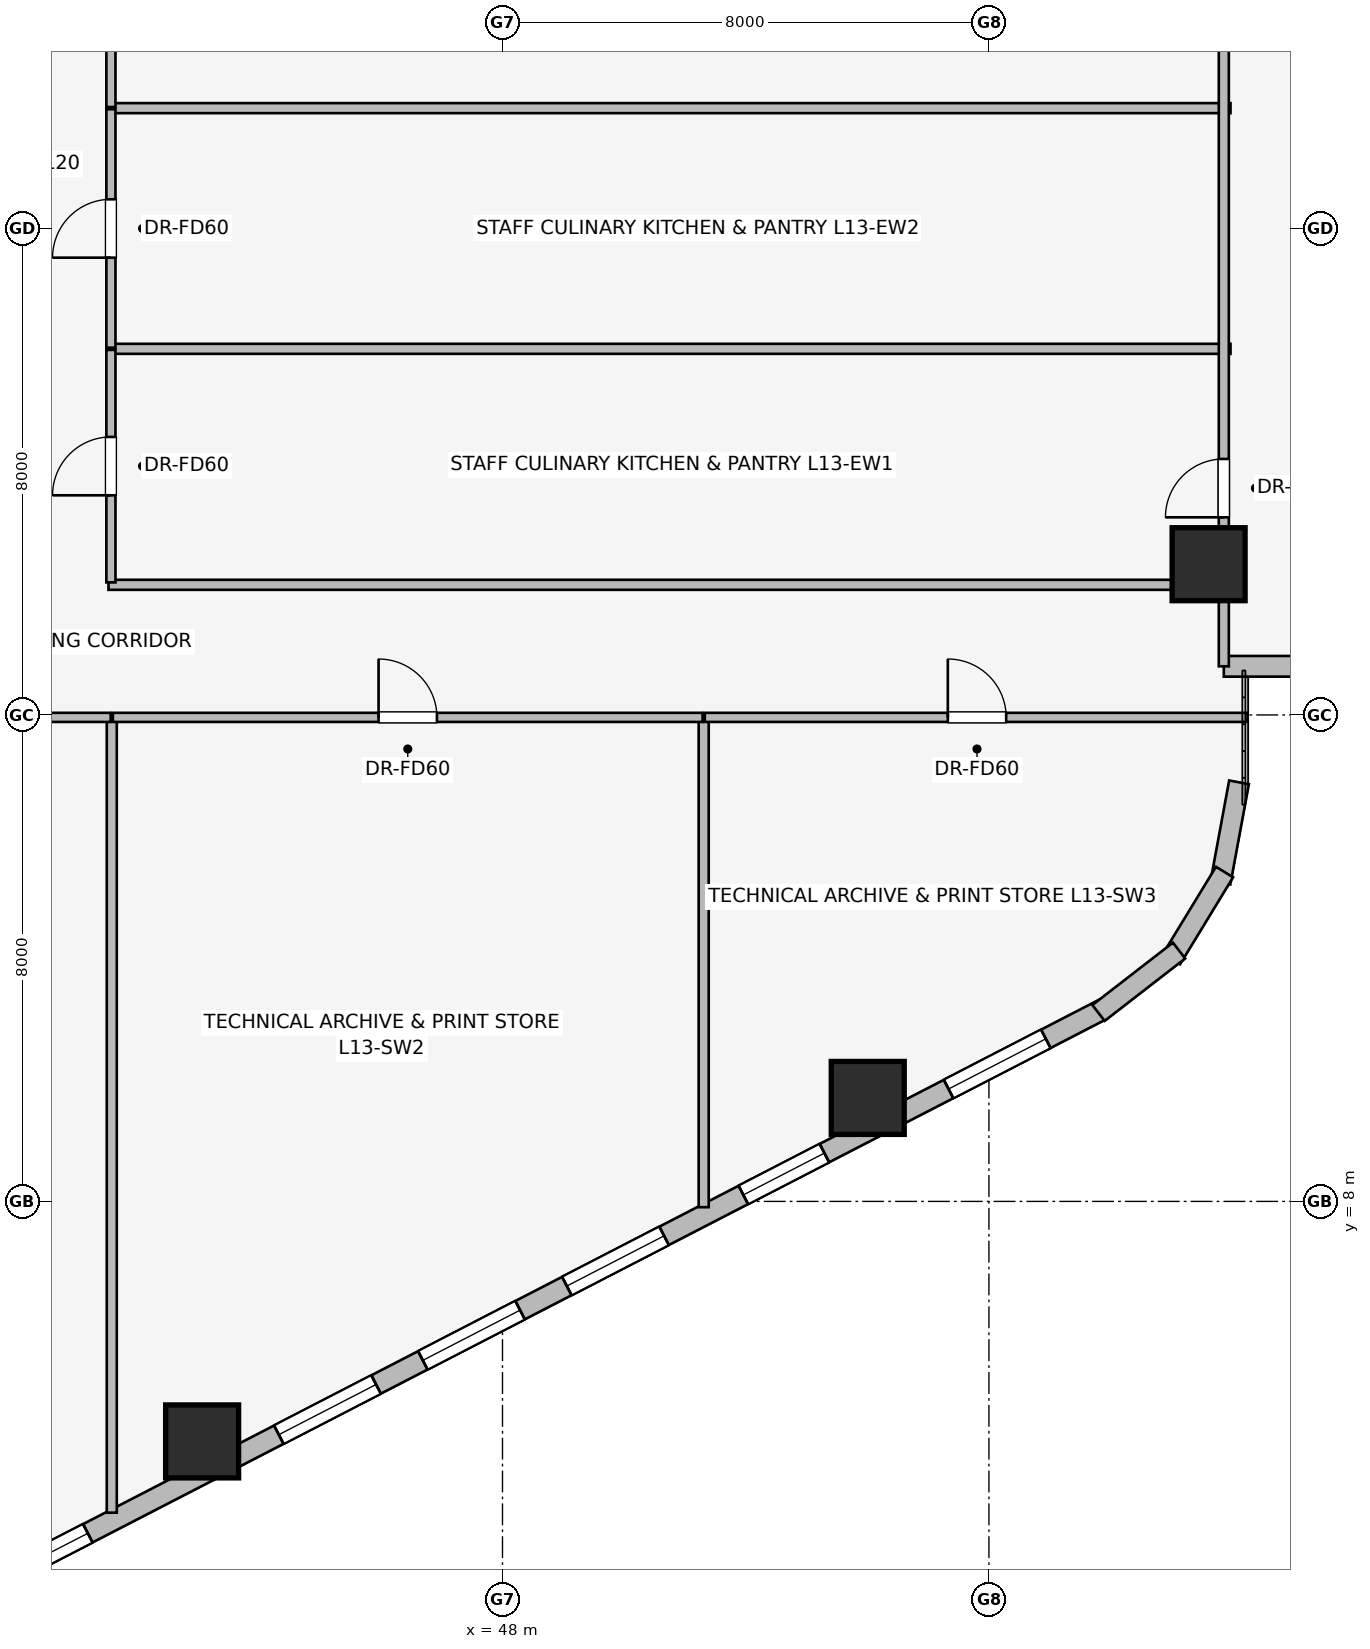
"""IFC4 building model, lengths in metres.
Left out: names, types, materials, properties, quantities, classifications, styles, units other than length and angle.
Written with IfcOpenShell. Run it as: python <this file> out.ifc"""

import sys

from ifc_helpers import new_model, si_unit, direction, frame, frame_2d, origin, origin_2d, place, context, subcontext, project, spatial, rectangle, extrude, element, fill, save


model = new_model("IFC4")
c1 = context("Model", 3, precision=1e-05, world=origin(), true_north=direction((0.0, 1.0)))
c2 = subcontext(c1, "Body", "Model", "MODEL_VIEW")
j1 = project(units=[si_unit("LENGTHUNIT", "METRE"), si_unit("PLANEANGLEUNIT", "RADIAN")], contexts=[c1])
p1 = place(None, origin())
s1 = spatial("IfcSite", under=j1, at=p1, CompositionType="ELEMENT")
p2 = place(p1, origin())
s2 = spatial("IfcBuilding", under=s1, at=p2, CompositionType="ELEMENT")
p3 = place(p2, frame((0.0, 0.0, 52.55)))
s3 = spatial("IfcBuildingStorey", under=s2, at=p3, CompositionType="ELEMENT", Elevation=52.55)
for number, where, z_axis, x_axis in (
    (1, (43.06, 4.053, 0.0), (0.0, 0.0, 1.0), (1.0, 0.0, 0.0)),
    (2, (54.007, 9.702, 0.0), (0.0, 0.0, 1.0), (1.0, 0.0, 0.0)),
    (3, (59.613, 18.479, 0.0), (0.0, 0.0, 1.0), (1.0, 0.0, 0.0)),
):
    element("IfcColumn", number, at=place(p3, frame(where, z_axis=z_axis, x_axis=x_axis)), inside=s3, PredefinedType="COLUMN", context=c2, shape_type="SweptSolid", body=[
        extrude(rectangle(XDim=1.2, YDim=1.2, at=origin_2d()), origin(), (0.0, 0.0, 1.0), 3.65),
    ])
p4 = place(p3, frame((57.876, 11.159, 0.0), z_axis=(0.0, 0.0, 1.0), x_axis=(-0.888634413993, -0.458616264721, 0.0)))
e4 = element("IfcWall", 4, at=p4, inside=s3, PredefinedType="STANDARD", context=c2, shape_type="SweptSolid", body=[
    extrude(rectangle(XDim=20.531, YDim=0.34, at=frame_2d((10.266, 0.0))), origin(), (0.0, 0.0, 1.0), 2.654),
])
p5 = place(p4, frame((1.058, 0.0, 0.75)))
e5 = element("IfcOpeningElement", 5, at=p5, cuts=e4, PredefinedType="OPENING", context=c2, shape_type="SweptSolid", body=[
    extrude(rectangle(XDim=1.8, YDim=1.5, at=frame_2d((0.9, 0.75))), frame((0.0, 0.18, 0.0), z_axis=(0.0, -1.0, 0.0), x_axis=(1.0, 0.0, 0.0)), (0.0, 0.0, 1.0), 0.36),
])
p6 = place(p4, frame((5.156, 0.0, 0.75)))
e6 = element("IfcOpeningElement", 6, at=p6, cuts=e4, PredefinedType="OPENING", context=c2, shape_type="SweptSolid", body=[
    extrude(rectangle(XDim=1.5, YDim=1.5, at=frame_2d((0.75, 0.75))), frame((0.0, 0.18, 0.0), z_axis=(0.0, -1.0, 0.0), x_axis=(1.0, 0.0, 0.0)), (0.0, 0.0, 1.0), 0.36),
])
p7 = place(p4, frame((8.123, 0.0, 0.75)))
e7 = element("IfcOpeningElement", 7, at=p7, cuts=e4, PredefinedType="OPENING", context=c2, shape_type="SweptSolid", body=[
    extrude(rectangle(XDim=1.8, YDim=1.5, at=frame_2d((0.9, 0.75))), frame((0.0, 0.18, 0.0), z_axis=(0.0, -1.0, 0.0), x_axis=(1.0, 0.0, 0.0)), (0.0, 0.0, 1.0), 0.36),
])
p8 = place(p4, frame((10.788, 0.0, 0.75)))
e8 = element("IfcOpeningElement", 8, at=p8, cuts=e4, PredefinedType="OPENING", context=c2, shape_type="SweptSolid", body=[
    extrude(rectangle(XDim=1.8, YDim=1.5, at=frame_2d((0.9, 0.75))), frame((0.0, 0.18, 0.0), z_axis=(0.0, -1.0, 0.0), x_axis=(1.0, 0.0, 0.0)), (0.0, 0.0, 1.0), 0.36),
])
p9 = place(p4, frame((13.453, 0.0, 0.75)))
e9 = element("IfcOpeningElement", 9, at=p9, cuts=e4, PredefinedType="OPENING", context=c2, shape_type="SweptSolid", body=[
    extrude(rectangle(XDim=1.8, YDim=1.5, at=frame_2d((0.9, 0.75))), frame((0.0, 0.18, 0.0), z_axis=(0.0, -1.0, 0.0), x_axis=(1.0, 0.0, 0.0)), (0.0, 0.0, 1.0), 0.36),
])
p10 = place(p4, frame((18.788, 0.0, 0.75)))
e10 = element("IfcOpeningElement", 10, at=p10, cuts=e4, PredefinedType="OPENING", context=c2, shape_type="SweptSolid", body=[
    extrude(rectangle(XDim=1.05, YDim=1.4, at=frame_2d((0.525, 0.7))), frame((0.0, 0.18, 0.0), z_axis=(0.0, -1.0, 0.0), x_axis=(1.0, 0.0, 0.0)), (0.0, 0.0, 1.0), 0.36),
])
p11 = place(p3, frame((60.113, 14.892, 0.0), z_axis=(0.0, 0.0, 1.0), x_axis=(-0.181714143354, -0.983351397063, 0.0)))
e11 = element("IfcWall", 11, at=p11, inside=s3, PredefinedType="STANDARD", context=c2, shape_type="SweptSolid", body=[
    extrude(rectangle(XDim=1.678, YDim=0.33, at=frame_2d((0.839, 0.0))), origin(), (0.0, 0.0, 1.0), 3.36),
])
p12 = place(p3, frame((59.875, 13.417, 0.0), z_axis=(0.0, 0.0, 1.0), x_axis=(-0.520584129191, -0.853810379671, 0.0)))
e12 = element("IfcWall", 12, at=p12, inside=s3, PredefinedType="STANDARD", context=c2, shape_type="SweptSolid", body=[
    extrude(rectangle(XDim=1.677, YDim=0.33, at=frame_2d((0.838, 0.0))), origin(), (0.0, 0.0, 1.0), 3.36),
])
p13 = place(p3, frame((59.127, 12.125, 0.0), z_axis=(0.0, 0.0, 1.0), x_axis=(-0.790691856293, -0.61221433207, 0.0)))
e13 = element("IfcWall", 13, at=p13, inside=s3, PredefinedType="STANDARD", context=c2, shape_type="SweptSolid", body=[
    extrude(rectangle(XDim=1.676, YDim=0.33, at=frame_2d((0.838, 0.0))), origin(), (0.0, 0.0, 1.0), 3.36),
])
p14 = place(p3, frame((78.863, 16.8, 0.0), z_axis=(0.0, 0.0, 1.0), x_axis=(-1.0, 0.0, 0.0)))
e14 = element("IfcWall", 14, at=p14, inside=s3, PredefinedType="STANDARD", context=c2, shape_type="SweptSolid", body=[
    extrude(rectangle(XDim=19.0, YDim=0.34, at=frame_2d((9.5, 0.0))), origin(), (0.0, 0.0, 1.0), 3.36),
])
p15 = place(p14, frame((2.633, 0.0, 0.75)))
e15 = element("IfcOpeningElement", 15, at=p15, cuts=e14, PredefinedType="OPENING", context=c2, shape_type="SweptSolid", body=[
    extrude(rectangle(XDim=1.8, YDim=1.5, at=frame_2d((0.9, 0.75))), frame((0.0, 0.18, 0.0), z_axis=(0.0, -1.0, 0.0), x_axis=(1.0, 0.0, 0.0)), (0.0, 0.0, 1.0), 0.36),
])
p16 = place(p14, frame((8.6, 0.0, 0.75)))
e16 = element("IfcOpeningElement", 16, at=p16, cuts=e14, PredefinedType="OPENING", context=c2, shape_type="SweptSolid", body=[
    extrude(rectangle(XDim=1.8, YDim=1.5, at=frame_2d((0.9, 0.75))), frame((0.0, 0.18, 0.0), z_axis=(0.0, -1.0, 0.0), x_axis=(1.0, 0.0, 0.0)), (0.0, 0.0, 1.0), 0.36),
])
p17 = place(p14, frame((14.567, 0.0, 0.75)))
e17 = element("IfcOpeningElement", 17, at=p17, cuts=e14, PredefinedType="OPENING", context=c2, shape_type="SweptSolid", body=[
    extrude(rectangle(XDim=1.8, YDim=1.5, at=frame_2d((0.9, 0.75))), frame((0.0, 0.18, 0.0), z_axis=(0.0, -1.0, 0.0), x_axis=(1.0, 0.0, 0.0)), (0.0, 0.0, 1.0), 0.36),
])
p18 = place(p3, frame((41.52, 18.14, 0.0), z_axis=(0.0, 0.0, 1.0), x_axis=(1.0, 0.0, 0.0)))
e18 = element("IfcWall", 18, at=p18, inside=s3, PredefinedType="PARTITIONING", context=c2, shape_type="SweptSolid", body=[
    extrude(rectangle(XDim=18.453, YDim=0.165, at=frame_2d((9.227, 0.0))), origin(), (0.0, 0.0, 1.0), 2.483),
])
for number, where, z_axis, x_axis in (
    (19, (41.59, 22.021, 0.0), (0.0, 0.0, 1.0), (1.0, 0.0, 0.0)),
    (20, (41.59, 25.979, 0.0), (0.0, 0.0, 1.0), (1.0, 0.0, 0.0)),
):
    element("IfcWall", number, at=place(p3, frame(where, z_axis=z_axis, x_axis=x_axis)), inside=s3, PredefinedType="PARTITIONING", context=c2, shape_type="SweptSolid", body=[
        extrude(rectangle(XDim=18.383, YDim=0.165, at=frame_2d((9.191, 0.0))), origin(), (0.0, 0.0, 1.0), 3.36),
    ])
p19 = place(p3, frame((41.56, 18.18, 0.0), z_axis=(0.0, 0.0, 1.0), x_axis=(0.0, 1.0, 0.0)))
e21 = element("IfcWall", 21, at=p19, inside=s3, PredefinedType="PARTITIONING", context=c2, shape_type="SweptSolid", body=[
    extrude(rectangle(XDim=3.823, YDim=0.15, at=frame_2d((1.912, 0.0))), origin(), (0.0, 0.0, 1.0), 3.36),
])
p20 = place(p19, frame((1.432, 0.0, 0.0)))
e22 = element("IfcOpeningElement", 22, at=p20, cuts=e21, PredefinedType="OPENING", context=c2, shape_type="SweptSolid", body=[
    extrude(rectangle(XDim=0.96, YDim=2.0, at=frame_2d((0.48, 1.0))), frame((0.0, 0.085, 0.0), z_axis=(0.0, -1.0, 0.0), x_axis=(1.0, 0.0, 0.0)), (0.0, 0.0, 1.0), 0.17),
])
p21 = place(p3, frame((41.56, 22.039, 0.0), z_axis=(0.0, 0.0, 1.0), x_axis=(0.0, 1.0, 0.0)))
e23 = element("IfcWall", 23, at=p21, inside=s3, PredefinedType="PARTITIONING", context=c2, shape_type="SweptSolid", body=[
    extrude(rectangle(XDim=3.922, YDim=0.15, at=frame_2d((1.961, 0.0))), origin(), (0.0, 0.0, 1.0), 3.36),
])
p22 = place(p21, frame((1.481, 0.0, 0.0)))
e24 = element("IfcOpeningElement", 24, at=p22, cuts=e23, PredefinedType="OPENING", context=c2, shape_type="SweptSolid", body=[
    extrude(rectangle(XDim=0.96, YDim=2.0, at=frame_2d((0.48, 1.0))), frame((0.0, 0.085, 0.0), z_axis=(0.0, -1.0, 0.0), x_axis=(1.0, 0.0, 0.0)), (0.0, 0.0, 1.0), 0.17),
])
p23 = place(p3, frame((41.56, 25.997, 0.0), z_axis=(0.0, 0.0, 1.0), x_axis=(0.0, 1.0, 0.0)))
e25 = element("IfcWall", 25, at=p23, inside=s3, PredefinedType="PARTITIONING", context=c2, shape_type="SweptSolid", body=[
    extrude(rectangle(XDim=3.823, YDim=0.15, at=frame_2d((1.912, 0.0))), origin(), (0.0, 0.0, 1.0), 3.36),
])
p24 = place(p23, frame((1.432, 0.0, 0.0)))
e26 = element("IfcOpeningElement", 26, at=p24, cuts=e25, PredefinedType="OPENING", context=c2, shape_type="SweptSolid", body=[
    extrude(rectangle(XDim=0.96, YDim=2.0, at=frame_2d((0.48, 1.0))), frame((0.0, 0.085, 0.0), z_axis=(0.0, -1.0, 0.0), x_axis=(1.0, 0.0, 0.0)), (0.0, 0.0, 1.0), 0.17),
])
p25 = place(p3, frame((41.574, 2.881, 0.0), z_axis=(0.0, 0.0, 1.0), x_axis=(0.0, 1.0, 0.0)))
e27 = element("IfcWall", 27, at=p25, inside=s3, PredefinedType="PARTITIONING", context=c2, shape_type="SweptSolid", body=[
    extrude(rectangle(XDim=13.049, YDim=0.165, at=frame_2d((6.524, 0.0))), origin(), (0.0, 0.0, 1.0), 2.483),
])
p26 = place(p3, frame((51.309, 7.905, 0.0), z_axis=(0.0, 0.0, 1.0), x_axis=(0.0, 1.0, 0.0)))
e28 = element("IfcWall", 28, at=p26, inside=s3, PredefinedType="PARTITIONING", context=c2, shape_type="SweptSolid", body=[
    extrude(rectangle(XDim=8.025, YDim=0.165, at=frame_2d((4.012, 0.0))), origin(), (0.0, 0.0, 1.0), 3.36),
])
p27 = place(p3, frame((32.85, 15.96, 0.0), z_axis=(0.0, 0.0, 1.0), x_axis=(1.0, 0.0, 0.0)))
e29 = element("IfcWall", 29, at=p27, inside=s3, PredefinedType="PARTITIONING", context=c2, shape_type="SweptSolid", body=[
    extrude(rectangle(XDim=8.706, YDim=0.15, at=frame_2d((4.353, 0.0))), origin(), (0.0, 0.0, 1.0), 3.36),
])
p28 = place(p27, frame((3.873, 0.0, 0.0)))
e30 = element("IfcOpeningElement", 30, at=p28, cuts=e29, PredefinedType="OPENING", context=c2, shape_type="SweptSolid", body=[
    extrude(rectangle(XDim=0.96, YDim=2.0, at=frame_2d((0.48, 1.0))), frame((0.0, 0.085, 0.0), z_axis=(0.0, -1.0, 0.0), x_axis=(1.0, 0.0, 0.0)), (0.0, 0.0, 1.0), 0.17),
])
p29 = place(p3, frame((41.592, 15.96, 0.0), z_axis=(0.0, 0.0, 1.0), x_axis=(1.0, 0.0, 0.0)))
e31 = element("IfcWall", 31, at=p29, inside=s3, PredefinedType="PARTITIONING", context=c2, shape_type="SweptSolid", body=[
    extrude(rectangle(XDim=9.699, YDim=0.15, at=frame_2d((4.85, 0.0))), origin(), (0.0, 0.0, 1.0), 3.36),
])
p30 = place(p29, frame((4.37, 0.0, 0.0)))
e32 = element("IfcOpeningElement", 32, at=p30, cuts=e31, PredefinedType="OPENING", context=c2, shape_type="SweptSolid", body=[
    extrude(rectangle(XDim=0.96, YDim=2.0, at=frame_2d((0.48, 1.0))), frame((0.0, 0.085, 0.0), z_axis=(0.0, -1.0, 0.0), x_axis=(1.0, 0.0, 0.0)), (0.0, 0.0, 1.0), 0.17),
])
p31 = place(p3, frame((51.327, 15.96, 0.0), z_axis=(0.0, 0.0, 1.0), x_axis=(1.0, 0.0, 0.0)))
e33 = element("IfcWall", 33, at=p31, inside=s3, PredefinedType="PARTITIONING", context=c2, shape_type="SweptSolid", body=[
    extrude(rectangle(XDim=8.926, YDim=0.15, at=frame_2d((4.463, 0.0))), origin(), (0.0, 0.0, 1.0), 3.36),
])
p32 = place(p31, frame((3.997, 0.0, 0.0)))
e34 = element("IfcOpeningElement", 34, at=p32, cuts=e33, PredefinedType="OPENING", context=c2, shape_type="SweptSolid", body=[
    extrude(rectangle(XDim=0.96, YDim=2.0, at=frame_2d((0.48, 1.0))), frame((0.0, 0.085, 0.0), z_axis=(0.0, -1.0, 0.0), x_axis=(1.0, 0.0, 0.0)), (0.0, 0.0, 1.0), 0.17),
])
p33 = place(p3, frame((59.863, 16.8, 0.0), z_axis=(0.0, 0.0, 1.0), x_axis=(0.0, 1.0, 0.0)))
e35 = element("IfcWall", 35, at=p33, inside=s3, PredefinedType="PARTITIONING", context=c2, shape_type="SweptSolid", body=[
    extrude(rectangle(XDim=14.4, YDim=0.165, at=frame_2d((7.2, 0.0))), origin(), (0.0, 0.0, 1.0), 2.654),
])
p34 = place(p33, frame((2.45, 0.0, 0.0)))
e36 = element("IfcOpeningElement", 36, at=p34, cuts=e35, PredefinedType="OPENING", context=c2, shape_type="SweptSolid", body=[
    extrude(rectangle(XDim=0.96, YDim=2.0, at=frame_2d((0.48, 1.0))), frame((0.0, 0.093, 0.0), z_axis=(0.0, -1.0, 0.0), x_axis=(1.0, 0.0, 0.0)), (0.0, 0.0, 1.0), 0.185),
])
p35 = place(p5, origin())
e37 = element("IfcWindow", 37, at=p35, inside=s3, PartitioningType="SINGLE_PANEL", PredefinedType="WINDOW", context=c2, shape_type="SweptSolid", body=[
    extrude(rectangle(XDim=1.8, YDim=1.5, at=frame_2d((0.9, 0.75))), frame((0.0, 0.03, 0.0), z_axis=(0.0, -1.0, 0.0), x_axis=(1.0, 0.0, 0.0)), (0.0, 0.0, 1.0), 0.06),
])
fill(e5, e37)
p36 = place(p6, origin())
e38 = element("IfcWindow", 38, at=p36, inside=s3, PartitioningType="SINGLE_PANEL", PredefinedType="WINDOW", context=c2, shape_type="SweptSolid", body=[
    extrude(rectangle(XDim=1.5, YDim=1.5, at=frame_2d((0.75, 0.75))), frame((0.0, 0.03, 0.0), z_axis=(0.0, -1.0, 0.0), x_axis=(1.0, 0.0, 0.0)), (0.0, 0.0, 1.0), 0.06),
])
fill(e6, e38)
p37 = place(p7, origin())
e39 = element("IfcWindow", 39, at=p37, inside=s3, PartitioningType="SINGLE_PANEL", PredefinedType="WINDOW", context=c2, shape_type="SweptSolid", body=[
    extrude(rectangle(XDim=1.8, YDim=1.5, at=frame_2d((0.9, 0.75))), frame((0.0, 0.03, 0.0), z_axis=(0.0, -1.0, 0.0), x_axis=(1.0, 0.0, 0.0)), (0.0, 0.0, 1.0), 0.06),
])
fill(e7, e39)
p38 = place(p8, origin())
e40 = element("IfcWindow", 40, at=p38, inside=s3, PartitioningType="SINGLE_PANEL", PredefinedType="WINDOW", context=c2, shape_type="SweptSolid", body=[
    extrude(rectangle(XDim=1.8, YDim=1.5, at=frame_2d((0.9, 0.75))), frame((0.0, 0.03, 0.0), z_axis=(0.0, -1.0, 0.0), x_axis=(1.0, 0.0, 0.0)), (0.0, 0.0, 1.0), 0.06),
])
fill(e8, e40)
p39 = place(p9, origin())
e41 = element("IfcWindow", 41, at=p39, inside=s3, PartitioningType="SINGLE_PANEL", PredefinedType="WINDOW", context=c2, shape_type="SweptSolid", body=[
    extrude(rectangle(XDim=1.8, YDim=1.5, at=frame_2d((0.9, 0.75))), frame((0.0, 0.03, 0.0), z_axis=(0.0, -1.0, 0.0), x_axis=(1.0, 0.0, 0.0)), (0.0, 0.0, 1.0), 0.06),
])
fill(e9, e41)
p40 = place(p10, origin())
e42 = element("IfcWindow", 42, at=p40, inside=s3, PartitioningType="SINGLE_PANEL", PredefinedType="WINDOW", context=c2, shape_type="SweptSolid", body=[
    extrude(rectangle(XDim=1.05, YDim=1.4, at=frame_2d((0.525, 0.7))), frame((0.0, 0.03, 0.0), z_axis=(0.0, -1.0, 0.0), x_axis=(1.0, 0.0, 0.0)), (0.0, 0.0, 1.0), 0.06),
])
fill(e10, e42)
p41 = place(p20, origin())
e43 = element("IfcDoor", 43, at=p41, inside=s3, OperationType="SINGLE_SWING_LEFT", PredefinedType="DOOR", context=c2, shape_type="SweptSolid", body=[
    extrude(rectangle(XDim=0.96, YDim=2.0, at=frame_2d((0.48, 1.0))), frame((0.0, 0.025, 0.0), z_axis=(0.0, -1.0, 0.0), x_axis=(1.0, 0.0, 0.0)), (0.0, 0.0, 1.0), 0.05),
])
fill(e22, e43)
p42 = place(p22, origin())
e44 = element("IfcDoor", 44, at=p42, inside=s3, OperationType="SINGLE_SWING_LEFT", PredefinedType="DOOR", context=c2, shape_type="SweptSolid", body=[
    extrude(rectangle(XDim=0.96, YDim=2.0, at=frame_2d((0.48, 1.0))), frame((0.0, 0.025, 0.0), z_axis=(0.0, -1.0, 0.0), x_axis=(1.0, 0.0, 0.0)), (0.0, 0.0, 1.0), 0.05),
])
fill(e24, e44)
p43 = place(p30, origin())
e45 = element("IfcDoor", 45, at=p43, inside=s3, OperationType="SINGLE_SWING_LEFT", PredefinedType="DOOR", context=c2, shape_type="SweptSolid", body=[
    extrude(rectangle(XDim=0.96, YDim=2.0, at=frame_2d((0.48, 1.0))), frame((0.0, 0.025, 0.0), z_axis=(0.0, -1.0, 0.0), x_axis=(1.0, 0.0, 0.0)), (0.0, 0.0, 1.0), 0.05),
])
fill(e32, e45)
p44 = place(p32, origin())
e46 = element("IfcDoor", 46, at=p44, inside=s3, OperationType="SINGLE_SWING_LEFT", PredefinedType="DOOR", context=c2, shape_type="SweptSolid", body=[
    extrude(rectangle(XDim=0.96, YDim=2.0, at=frame_2d((0.48, 1.0))), frame((0.0, 0.025, 0.0), z_axis=(0.0, -1.0, 0.0), x_axis=(1.0, 0.0, 0.0)), (0.0, 0.0, 1.0), 0.05),
])
fill(e34, e46)
p45 = place(p34, origin())
e47 = element("IfcDoor", 47, at=p45, inside=s3, OperationType="SINGLE_SWING_LEFT", PredefinedType="DOOR", context=c2, shape_type="SweptSolid", body=[
    extrude(rectangle(XDim=0.96, YDim=2.0, at=frame_2d((0.48, 1.0))), frame((0.0, 0.025, 0.0), z_axis=(0.0, -1.0, 0.0), x_axis=(1.0, 0.0, 0.0)), (0.0, 0.0, 1.0), 0.05),
])
fill(e36, e47)
save(model, sys.argv[1])
